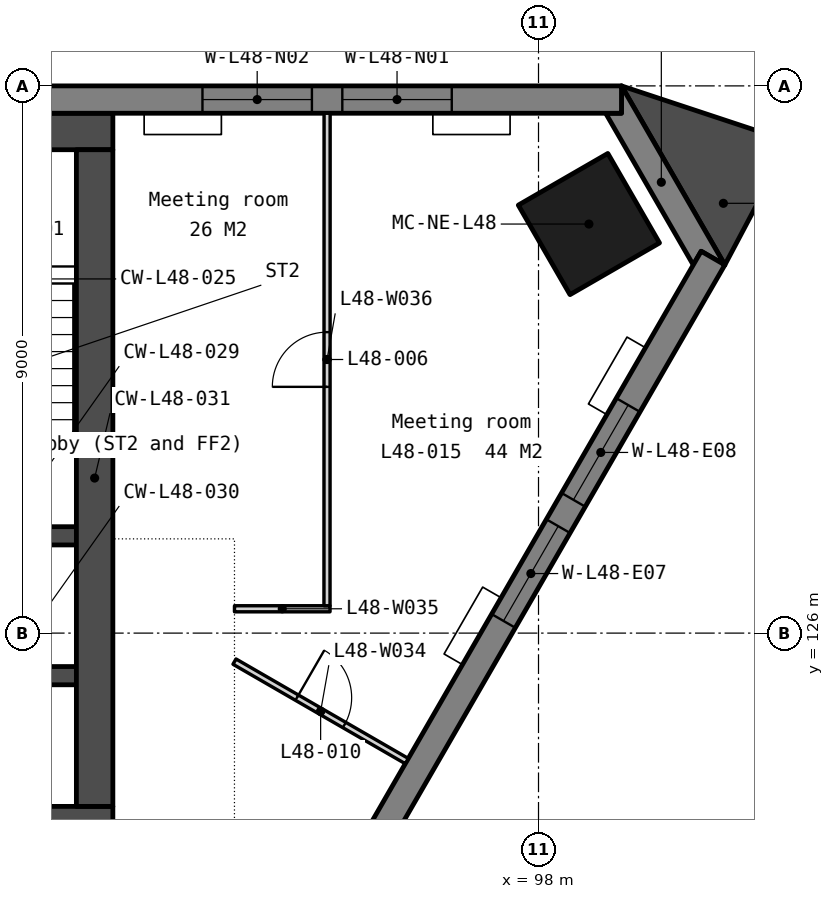
"""IFC4 building model, lengths in metres.
Left out: names, types, materials, properties, quantities, classifications, styles, units other than length and angle.
Written with IfcOpenShell. Run it as: python <this file> out.ifc"""

import sys

from ifc_helpers import new_model, si_unit, direction, frame, frame_2d, origin, origin_2d, place, context, subcontext, project, spatial, polyline, rectangle, outline, extrude, element, fill, save


model = new_model("IFC4")
c1 = context("Model", 3, precision=1e-05, world=origin(), true_north=direction((0.0, 1.0)))
c2 = subcontext(c1, "Body", "Model", "MODEL_VIEW")
j1 = project(units=[si_unit("LENGTHUNIT", "METRE"), si_unit("PLANEANGLEUNIT", "RADIAN")], contexts=[c1])
p1 = place(None, origin())
s1 = spatial("IfcSite", under=j1, at=p1, CompositionType="ELEMENT")
p2 = place(p1, origin())
s2 = spatial("IfcBuilding", under=s1, at=p2, CompositionType="ELEMENT")
p3 = place(p2, frame((0.0, 0.0, 191.9)))
s3 = spatial("IfcBuildingStorey", under=s2, at=p3, CompositionType="ELEMENT", Elevation=191.9)
p4 = place(p3, frame((98.829, 132.728, 0.0), z_axis=(0.0, 0.0, 1.0), x_axis=(-0.5, 0.866025403784, 0.0)))
e1 = element("IfcColumn", 1, at=p4, inside=s3, PredefinedType="COLUMN", context=c2, shape_type="SweptSolid", body=[
    extrude(rectangle(XDim=1.7, YDim=1.7, at=origin_2d()), origin(), (0.0, 0.0, 1.0), 3.9),
])
p5 = place(p3, frame((69.0, 134.25, 0.0), z_axis=(0.0, 0.0, 1.0), x_axis=(1.0, 0.0, 0.0)))
e2 = element("IfcWall", 2, at=p5, inside=s3, PredefinedType="SOLIDWALL", context=c2, shape_type="SweptSolid", body=[
    extrude(rectangle(XDim=22.0, YDim=0.6, at=frame_2d((11.0, 0.0))), origin(), (0.0, 0.0, 1.0), 3.75),
])
p6 = place(p3, frame((69.0, 122.85, 0.0), z_axis=(0.0, 0.0, 1.0), x_axis=(1.0, 0.0, 0.0)))
e3 = element("IfcWall", 3, at=p6, inside=s3, PredefinedType="SOLIDWALL", context=c2, shape_type="SweptSolid", body=[
    extrude(rectangle(XDim=22.0, YDim=0.6, at=frame_2d((11.0, 0.0))), origin(), (0.0, 0.0, 1.0), 3.75),
])
p7 = place(p6, frame((16.375, 0.0, 0.0)))
e4 = element("IfcOpeningElement", 4, at=p7, cuts=e3, PredefinedType="OPENING", context=c2, shape_type="SweptSolid", body=[
    extrude(rectangle(XDim=1.8, YDim=2.1, at=frame_2d((0.9, 1.05))), frame((0.0, 0.31, 0.0), z_axis=(0.0, -1.0, 0.0), x_axis=(1.0, 0.0, 0.0)), (0.0, 0.0, 1.0), 0.62),
])
p8 = place(p6, frame((3.825, 0.0, 0.0)))
e5 = element("IfcOpeningElement", 5, at=p8, cuts=e3, PredefinedType="OPENING", context=c2, shape_type="SweptSolid", body=[
    extrude(rectangle(XDim=1.8, YDim=2.1, at=frame_2d((0.9, 1.05))), frame((0.0, 0.31, 0.0), z_axis=(0.0, -1.0, 0.0), x_axis=(1.0, 0.0, 0.0)), (0.0, 0.0, 1.0), 0.62),
])
p9 = place(p6, frame((12.85, 0.0, 0.0)))
e6 = element("IfcOpeningElement", 6, at=p9, cuts=e3, PredefinedType="OPENING", context=c2, shape_type="SweptSolid", body=[
    extrude(rectangle(XDim=1.5, YDim=2.1, at=frame_2d((0.75, 1.05))), frame((0.0, 0.31, 0.0), z_axis=(0.0, -1.0, 0.0), x_axis=(1.0, 0.0, 0.0)), (0.0, 0.0, 1.0), 0.62),
])
for number, where, z_axis, x_axis in (
    (7, (87.85, 127.6, 0.0), (0.0, 0.0, 1.0), (1.0, 0.0, 0.0)),
    (8, (87.85, 125.3, 0.0), (0.0, 0.0, 1.0), (1.0, 0.0, 0.0)),
):
    element("IfcWall", number, at=place(p3, frame(where, z_axis=z_axis, x_axis=x_axis)), inside=s3, PredefinedType="SOLIDWALL", context=c2, shape_type="SweptSolid", body=[
        extrude(rectangle(XDim=2.55, YDim=0.3, at=frame_2d((1.275, 0.0))), origin(), (0.0, 0.0, 1.0), 3.75),
    ])
p10 = place(p3, frame((90.7, 133.95, 0.0), z_axis=(0.0, 0.0, 1.0), x_axis=(0.0, -1.0, 0.0)))
e9 = element("IfcWall", 9, at=p10, inside=s3, PredefinedType="SOLIDWALL", context=c2, shape_type="SweptSolid", body=[
    extrude(rectangle(XDim=10.8, YDim=0.6, at=frame_2d((5.4, 0.0))), origin(), (0.0, 0.0, 1.0), 3.75),
])
p11 = place(p3, frame((0.0, 0.0, -0.15)))
e10 = element("IfcWall", 10, at=p11, inside=s3, PredefinedType="SOLIDWALL", context=c2, shape_type="SweptSolid", body=[
    extrude(outline(polyline([(101.065, 132.055), (100.675, 132.281), (100.545, 132.055), (99.105, 134.55), (99.365, 134.55), (99.365, 135.0), (101.065, 132.055)])), origin(), (0.0, 0.0, 1.0), 3.9),
])
p12 = place(p3, frame((99.365, 134.775, -0.15), z_axis=(0.0, 0.0, 1.0), x_axis=(-1.0, 0.0, 0.0)))
e11 = element("IfcWall", 11, at=p12, inside=s3, PredefinedType="SOLIDWALL", context=c2, shape_type="SweptSolid", body=[
    extrude(outline(polyline([(0.0, 0.0), (0.0, 3.9), (31.988, 3.9), (31.988, 0.0), (0.0, 0.0)])), frame((0.0, 0.225, 0.0), z_axis=(0.0, -1.0, 0.0), x_axis=(1.0, 0.0, 0.0)), (0.0, 0.0, 1.0), 0.45),
])
p13 = place(p12, frame((2.791, 0.0, 0.95)))
e12 = element("IfcOpeningElement", 12, at=p13, cuts=e11, PredefinedType="OPENING", context=c2, shape_type="SweptSolid", body=[
    extrude(rectangle(XDim=1.8, YDim=2.2, at=frame_2d((0.9, 1.1))), frame((0.0, 0.235, 0.0), z_axis=(0.0, -1.0, 0.0), x_axis=(1.0, 0.0, 0.0)), (0.0, 0.0, 1.0), 0.47),
])
p14 = place(p12, frame((5.091, 0.0, 0.95)))
e13 = element("IfcOpeningElement", 13, at=p14, cuts=e11, PredefinedType="OPENING", context=c2, shape_type="SweptSolid", body=[
    extrude(rectangle(XDim=1.8, YDim=2.2, at=frame_2d((0.9, 1.1))), frame((0.0, 0.235, 0.0), z_axis=(0.0, -1.0, 0.0), x_axis=(1.0, 0.0, 0.0)), (0.0, 0.0, 1.0), 0.47),
])
p15 = place(p12, frame((12.473, 0.0, 0.95)))
e14 = element("IfcOpeningElement", 14, at=p15, cuts=e11, PredefinedType="OPENING", context=c2, shape_type="SweptSolid", body=[
    extrude(rectangle(XDim=1.8, YDim=2.2, at=frame_2d((0.9, 1.1))), frame((0.0, 0.235, 0.0), z_axis=(0.0, -1.0, 0.0), x_axis=(1.0, 0.0, 0.0)), (0.0, 0.0, 1.0), 0.47),
])
p16 = place(p12, frame((14.773, 0.0, 0.95)))
e15 = element("IfcOpeningElement", 15, at=p16, cuts=e11, PredefinedType="OPENING", context=c2, shape_type="SweptSolid", body=[
    extrude(rectangle(XDim=1.8, YDim=2.2, at=frame_2d((0.9, 1.1))), frame((0.0, 0.235, 0.0), z_axis=(0.0, -1.0, 0.0), x_axis=(1.0, 0.0, 0.0)), (0.0, 0.0, 1.0), 0.47),
])
p17 = place(p12, frame((22.156, 0.0, 0.95)))
e16 = element("IfcOpeningElement", 16, at=p17, cuts=e11, PredefinedType="OPENING", context=c2, shape_type="SweptSolid", body=[
    extrude(rectangle(XDim=1.8, YDim=2.2, at=frame_2d((0.9, 1.1))), frame((0.0, 0.235, 0.0), z_axis=(0.0, -1.0, 0.0), x_axis=(1.0, 0.0, 0.0)), (0.0, 0.0, 1.0), 0.47),
])
p18 = place(p12, frame((24.456, 0.0, 0.95)))
e17 = element("IfcOpeningElement", 17, at=p18, cuts=e11, PredefinedType="OPENING", context=c2, shape_type="SweptSolid", body=[
    extrude(rectangle(XDim=1.8, YDim=2.2, at=frame_2d((0.9, 1.1))), frame((0.0, 0.235, 0.0), z_axis=(0.0, -1.0, 0.0), x_axis=(1.0, 0.0, 0.0)), (0.0, 0.0, 1.0), 0.47),
])
p19 = place(p3, frame((81.505, 98.627, -0.15), z_axis=(0.0, 0.0, 1.0), x_axis=(0.500002199942, 0.866024133644, 0.0)))
e18 = element("IfcWall", 18, at=p19, inside=s3, PredefinedType="SOLIDWALL", context=c2, shape_type="SweptSolid", body=[
    extrude(outline(polyline([(38.729, 0.0), (38.729, 3.9), (0.0, 3.9), (0.0, 0.0), (38.729, 0.0)])), frame((0.0, 0.225, 0.0), z_axis=(0.0, -1.0, 0.0), x_axis=(1.0, 0.0, 0.0)), (0.0, 0.0, 1.0), 0.45),
])
p20 = place(p19, frame((2.791, 0.0, 0.95)))
e19 = element("IfcOpeningElement", 19, at=p20, cuts=e18, PredefinedType="OPENING", context=c2, shape_type="SweptSolid", body=[
    extrude(rectangle(XDim=1.8, YDim=2.2, at=frame_2d((0.9, 1.1))), frame((0.0, 0.235, 0.0), z_axis=(0.0, -1.0, 0.0), x_axis=(1.0, 0.0, 0.0)), (0.0, 0.0, 1.0), 0.47),
])
p21 = place(p19, frame((5.091, 0.0, 0.95)))
e20 = element("IfcOpeningElement", 20, at=p21, cuts=e18, PredefinedType="OPENING", context=c2, shape_type="SweptSolid", body=[
    extrude(rectangle(XDim=1.8, YDim=2.2, at=frame_2d((0.9, 1.1))), frame((0.0, 0.235, 0.0), z_axis=(0.0, -1.0, 0.0), x_axis=(1.0, 0.0, 0.0)), (0.0, 0.0, 1.0), 0.47),
])
p22 = place(p19, frame((12.473, 0.0, 0.95)))
e21 = element("IfcOpeningElement", 21, at=p22, cuts=e18, PredefinedType="OPENING", context=c2, shape_type="SweptSolid", body=[
    extrude(rectangle(XDim=1.8, YDim=2.2, at=frame_2d((0.9, 1.1))), frame((0.0, 0.235, 0.0), z_axis=(0.0, -1.0, 0.0), x_axis=(1.0, 0.0, 0.0)), (0.0, 0.0, 1.0), 0.47),
])
p23 = place(p19, frame((14.773, 0.0, 0.95)))
e22 = element("IfcOpeningElement", 22, at=p23, cuts=e18, PredefinedType="OPENING", context=c2, shape_type="SweptSolid", body=[
    extrude(rectangle(XDim=1.8, YDim=2.2, at=frame_2d((0.9, 1.1))), frame((0.0, 0.235, 0.0), z_axis=(0.0, -1.0, 0.0), x_axis=(1.0, 0.0, 0.0)), (0.0, 0.0, 1.0), 0.47),
])
p24 = place(p19, frame((22.156, 0.0, 0.95)))
e23 = element("IfcOpeningElement", 23, at=p24, cuts=e18, PredefinedType="OPENING", context=c2, shape_type="SweptSolid", body=[
    extrude(rectangle(XDim=1.8, YDim=2.2, at=frame_2d((0.9, 1.1))), frame((0.0, 0.235, 0.0), z_axis=(0.0, -1.0, 0.0), x_axis=(1.0, 0.0, 0.0)), (0.0, 0.0, 1.0), 0.47),
])
p25 = place(p19, frame((24.456, 0.0, 0.95)))
e24 = element("IfcOpeningElement", 24, at=p25, cuts=e18, PredefinedType="OPENING", context=c2, shape_type="SweptSolid", body=[
    extrude(rectangle(XDim=1.8, YDim=2.2, at=frame_2d((0.9, 1.1))), frame((0.0, 0.235, 0.0), z_axis=(0.0, -1.0, 0.0), x_axis=(1.0, 0.0, 0.0)), (0.0, 0.0, 1.0), 0.47),
])
p26 = place(p19, frame((31.838, 0.0, 0.95)))
e25 = element("IfcOpeningElement", 25, at=p26, cuts=e18, PredefinedType="OPENING", context=c2, shape_type="SweptSolid", body=[
    extrude(rectangle(XDim=1.8, YDim=2.2, at=frame_2d((0.9, 1.1))), frame((0.0, 0.235, 0.0), z_axis=(0.0, -1.0, 0.0), x_axis=(1.0, 0.0, 0.0)), (0.0, 0.0, 1.0), 0.47),
])
p27 = place(p19, frame((34.138, 0.0, 0.95)))
e26 = element("IfcOpeningElement", 26, at=p27, cuts=e18, PredefinedType="OPENING", context=c2, shape_type="SweptSolid", body=[
    extrude(rectangle(XDim=1.8, YDim=2.2, at=frame_2d((0.9, 1.1))), frame((0.0, 0.235, 0.0), z_axis=(0.0, -1.0, 0.0), x_axis=(1.0, 0.0, 0.0)), (0.0, 0.0, 1.0), 0.47),
])
p28 = place(p3, frame((0.0, 0.0, -0.15)))
e27 = element("IfcWall", 27, at=p28, inside=s3, PredefinedType="SOLIDWALL", context=c2, shape_type="SweptSolid", body=[
    extrude(outline(polyline([(101.065, 132.055), (102.138, 134.082), (99.365, 135.0), (101.065, 132.055)])), origin(), (0.0, 0.0, 1.0), 3.9),
])
p29 = place(p3, frame((93.0, 125.531, 0.0), z_axis=(0.0, 0.0, 1.0), x_axis=(0.866035243948, -0.499982955949, 0.0)))
e28 = element("IfcWall", 28, at=p29, inside=s3, PredefinedType="PARTITIONING", context=c2, shape_type="SweptSolid", body=[
    extrude(rectangle(XDim=3.272, YDim=0.1, at=frame_2d((1.636, 0.0))), origin(), (0.0, 0.0, 1.0), 3.75),
])
p30 = place(p29, frame((1.186, 0.0, 0.0)))
e29 = element("IfcOpeningElement", 29, at=p30, cuts=e28, PredefinedType="OPENING", context=c2, shape_type="SweptSolid", body=[
    extrude(rectangle(XDim=0.9, YDim=2.1, at=frame_2d((0.45, 1.05))), frame((0.0, 0.06, 0.0), z_axis=(0.0, -1.0, 0.0), x_axis=(1.0, 0.0, 0.0)), (0.0, 0.0, 1.0), 0.12),
])
p31 = place(p3, frame((93.0, 126.4, 0.0), z_axis=(0.0, 0.0, 1.0), x_axis=(1.0, 0.0, 0.0)))
e30 = element("IfcWall", 30, at=p31, inside=s3, PredefinedType="PARTITIONING", context=c2, shape_type="SweptSolid", body=[
    extrude(rectangle(XDim=1.572, YDim=0.1, at=frame_2d((0.786, 0.0))), origin(), (0.0, 0.0, 1.0), 3.75),
])
p32 = place(p3, frame((94.521, 126.45, 0.0), z_axis=(0.0, 0.0, 1.0), x_axis=(0.000241123629, 0.99999997093, 0.0)))
e31 = element("IfcWall", 31, at=p32, inside=s3, PredefinedType="PARTITIONING", context=c2, shape_type="SweptSolid", body=[
    extrude(rectangle(XDim=8.1, YDim=0.1, at=frame_2d((4.05, 0.0))), origin(), (0.0, 0.0, 1.0), 3.75),
])
p33 = place(p32, frame((3.6, 0.0, 0.0)))
e32 = element("IfcOpeningElement", 32, at=p33, cuts=e31, PredefinedType="OPENING", context=c2, shape_type="SweptSolid", body=[
    extrude(rectangle(XDim=0.9, YDim=2.1, at=frame_2d((0.45, 1.05))), frame((0.0, 0.06, 0.0), z_axis=(0.0, -1.0, 0.0), x_axis=(1.0, 0.0, 0.0)), (0.0, 0.0, 1.0), 0.12),
])
p34 = place(p13, origin())
e33 = element("IfcWindow", 33, at=p34, inside=s3, PartitioningType="SINGLE_PANEL", PredefinedType="WINDOW", context=c2, shape_type="SweptSolid", body=[
    extrude(rectangle(XDim=1.8, YDim=2.2, at=frame_2d((0.9, 1.1))), frame((0.0, 0.03, 0.0), z_axis=(0.0, -1.0, 0.0), x_axis=(1.0, 0.0, 0.0)), (0.0, 0.0, 1.0), 0.06),
])
fill(e12, e33)
p35 = place(p14, origin())
e34 = element("IfcWindow", 34, at=p35, inside=s3, PartitioningType="SINGLE_PANEL", PredefinedType="WINDOW", context=c2, shape_type="SweptSolid", body=[
    extrude(rectangle(XDim=1.8, YDim=2.2, at=frame_2d((0.9, 1.1))), frame((0.0, 0.03, 0.0), z_axis=(0.0, -1.0, 0.0), x_axis=(1.0, 0.0, 0.0)), (0.0, 0.0, 1.0), 0.06),
])
fill(e13, e34)
p36 = place(p26, origin())
e35 = element("IfcWindow", 35, at=p36, inside=s3, PartitioningType="SINGLE_PANEL", PredefinedType="WINDOW", context=c2, shape_type="SweptSolid", body=[
    extrude(rectangle(XDim=1.8, YDim=2.2, at=frame_2d((0.9, 1.1))), frame((0.0, 0.03, 0.0), z_axis=(0.0, -1.0, 0.0), x_axis=(1.0, 0.0, 0.0)), (0.0, 0.0, 1.0), 0.06),
])
fill(e25, e35)
p37 = place(p27, origin())
e36 = element("IfcWindow", 36, at=p37, inside=s3, PartitioningType="SINGLE_PANEL", PredefinedType="WINDOW", context=c2, shape_type="SweptSolid", body=[
    extrude(rectangle(XDim=1.8, YDim=2.2, at=frame_2d((0.9, 1.1))), frame((0.0, 0.03, 0.0), z_axis=(0.0, -1.0, 0.0), x_axis=(1.0, 0.0, 0.0)), (0.0, 0.0, 1.0), 0.06),
])
fill(e26, e36)
p38 = place(p33, origin())
e37 = element("IfcDoor", 37, at=p38, inside=s3, OperationType="SINGLE_SWING_LEFT", PredefinedType="DOOR", context=c2, shape_type="SweptSolid", body=[
    extrude(rectangle(XDim=0.9, YDim=2.1, at=frame_2d((0.45, 1.05))), frame((0.0, 0.025, 0.0), z_axis=(0.0, -1.0, 0.0), x_axis=(1.0, 0.0, 0.0)), (0.0, 0.0, 1.0), 0.05),
])
fill(e32, e37)
p39 = place(p30, origin())
e38 = element("IfcDoor", 38, at=p39, inside=s3, OperationType="SINGLE_SWING_LEFT", PredefinedType="DOOR", context=c2, shape_type="SweptSolid", body=[
    extrude(rectangle(XDim=0.9, YDim=2.1, at=frame_2d((0.45, 1.05))), frame((0.0, 0.025, 0.0), z_axis=(0.0, -1.0, 0.0), x_axis=(1.0, 0.0, 0.0)), (0.0, 0.0, 1.0), 0.05),
])
fill(e29, e38)
save(model, sys.argv[1])
